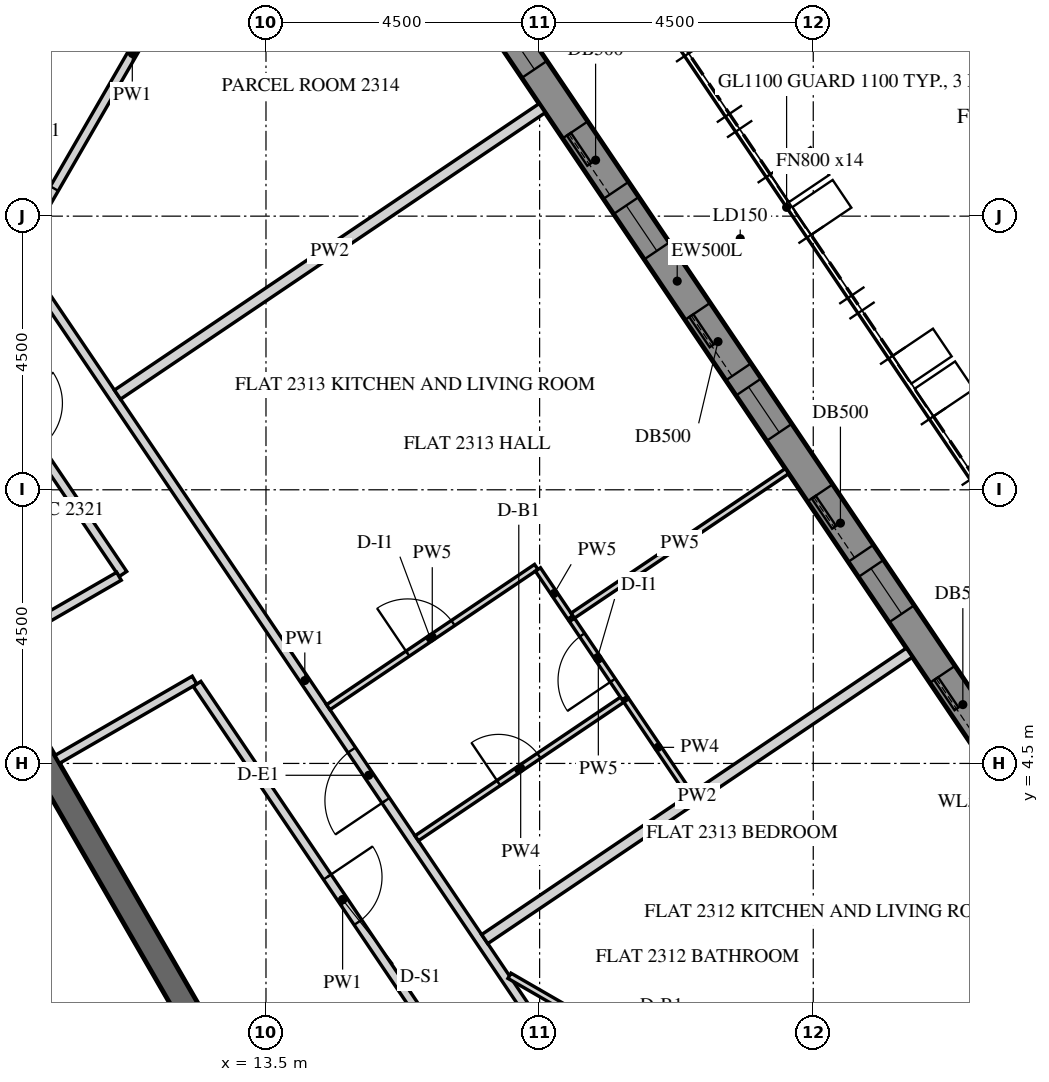
"""IFC4 building model, lengths in metres.
Left out: names, types, materials, properties, quantities, classifications, styles, units other than length and angle.
Written with IfcOpenShell. Run it as: python <this file> out.ifc"""

import sys

from ifc_helpers import new_model, si_unit, direction, frame, frame_2d, origin, place, context, subcontext, project, spatial, polyline, rectangle, outline, extrude, element, fill, save


model = new_model("IFC4")
c1 = context("Model", 3, precision=1e-05, world=origin(), true_north=direction((0.0, 1.0)))
c2 = subcontext(c1, "Body", "Model", "MODEL_VIEW")
j1 = project(units=[si_unit("LENGTHUNIT", "METRE"), si_unit("PLANEANGLEUNIT", "RADIAN")], contexts=[c1])
p1 = place(None, origin())
s1 = spatial("IfcSite", under=j1, at=p1, CompositionType="ELEMENT")
p2 = place(p1, origin())
s2 = spatial("IfcBuilding", under=s1, at=p2, CompositionType="ELEMENT")
p3 = place(p2, frame((0.0, 0.0, 291.3)))
s3 = spatial("IfcBuildingStorey", under=s2, at=p3, CompositionType="ELEMENT", Elevation=291.3)
p4 = place(p3, frame((26.706, 2.879, -0.15), z_axis=(0.0, 0.0, 1.0), x_axis=(-0.559197891507, 0.829034208061, 0.0)))
e1 = element("IfcWall", 1, at=p4, inside=s3, PredefinedType="SOLIDWALL", context=c2, shape_type="SweptSolid", body=[
    extrude(outline(polyline([(0.25, -0.25), (22.795, -0.25), (23.295, 0.25), (-0.25, 0.25), (0.25, -0.25)])), origin(), (0.0, 0.0, 1.0), 3.9),
])
p5 = place(p4, frame((1.323, 0.0, 1.05)))
e2 = element("IfcOpeningElement", 2, at=p5, cuts=e1, PredefinedType="OPENING", context=c2, shape_type="SweptSolid", body=[
    extrude(rectangle(XDim=0.9, YDim=1.5, at=frame_2d((0.45, 0.75))), frame((0.0, 0.26, 0.0), z_axis=(0.0, -1.0, 0.0), x_axis=(1.0, 0.0, 0.0)), (0.0, 0.0, 1.0), 0.52),
])
p6 = place(p4, frame((2.522, 0.0, 0.15)))
e3 = element("IfcOpeningElement", 3, at=p6, cuts=e1, PredefinedType="OPENING", context=c2, shape_type="SweptSolid", body=[
    extrude(rectangle(XDim=1.2, YDim=2.4, at=frame_2d((0.6, 1.2))), frame((0.0, 0.26, 0.0), z_axis=(0.0, -1.0, 0.0), x_axis=(1.0, 0.0, 0.0)), (0.0, 0.0, 1.0), 0.52),
])
p7 = place(p4, frame((4.922, 0.0, 1.05)))
e4 = element("IfcOpeningElement", 4, at=p7, cuts=e1, PredefinedType="OPENING", context=c2, shape_type="SweptSolid", body=[
    extrude(rectangle(XDim=0.9, YDim=1.5, at=frame_2d((0.45, 0.75))), frame((0.0, 0.26, 0.0), z_axis=(0.0, -1.0, 0.0), x_axis=(1.0, 0.0, 0.0)), (0.0, 0.0, 1.0), 0.52),
])
p8 = place(p4, frame((6.122, 0.0, 0.15)))
e5 = element("IfcOpeningElement", 5, at=p8, cuts=e1, PredefinedType="OPENING", context=c2, shape_type="SweptSolid", body=[
    extrude(rectangle(XDim=1.2, YDim=2.4, at=frame_2d((0.6, 1.2))), frame((0.0, 0.26, 0.0), z_axis=(0.0, -1.0, 0.0), x_axis=(1.0, 0.0, 0.0)), (0.0, 0.0, 1.0), 0.52),
])
p9 = place(p4, frame((8.522, 0.0, 1.05)))
e6 = element("IfcOpeningElement", 6, at=p9, cuts=e1, PredefinedType="OPENING", context=c2, shape_type="SweptSolid", body=[
    extrude(rectangle(XDim=0.9, YDim=1.5, at=frame_2d((0.45, 0.75))), frame((0.0, 0.26, 0.0), z_axis=(0.0, -1.0, 0.0), x_axis=(1.0, 0.0, 0.0)), (0.0, 0.0, 1.0), 0.52),
])
p10 = place(p4, frame((9.722, 0.0, 0.15)))
e7 = element("IfcOpeningElement", 7, at=p10, cuts=e1, PredefinedType="OPENING", context=c2, shape_type="SweptSolid", body=[
    extrude(rectangle(XDim=1.2, YDim=2.4, at=frame_2d((0.6, 1.2))), frame((0.0, 0.26, 0.0), z_axis=(0.0, -1.0, 0.0), x_axis=(1.0, 0.0, 0.0)), (0.0, 0.0, 1.0), 0.52),
])
p11 = place(p4, frame((12.122, 0.0, 1.05)))
e8 = element("IfcOpeningElement", 8, at=p11, cuts=e1, PredefinedType="OPENING", context=c2, shape_type="SweptSolid", body=[
    extrude(rectangle(XDim=0.9, YDim=1.5, at=frame_2d((0.45, 0.75))), frame((0.0, 0.26, 0.0), z_axis=(0.0, -1.0, 0.0), x_axis=(1.0, 0.0, 0.0)), (0.0, 0.0, 1.0), 0.52),
])
p12 = place(p4, frame((13.323, 0.0, 0.15)))
e9 = element("IfcOpeningElement", 9, at=p12, cuts=e1, PredefinedType="OPENING", context=c2, shape_type="SweptSolid", body=[
    extrude(rectangle(XDim=1.2, YDim=2.4, at=frame_2d((0.6, 1.2))), frame((0.0, 0.26, 0.0), z_axis=(0.0, -1.0, 0.0), x_axis=(1.0, 0.0, 0.0)), (0.0, 0.0, 1.0), 0.52),
])
p13 = place(p4, frame((15.722, 0.0, 1.05)))
e10 = element("IfcOpeningElement", 10, at=p13, cuts=e1, PredefinedType="OPENING", context=c2, shape_type="SweptSolid", body=[
    extrude(rectangle(XDim=0.9, YDim=1.5, at=frame_2d((0.45, 0.75))), frame((0.0, 0.26, 0.0), z_axis=(0.0, -1.0, 0.0), x_axis=(1.0, 0.0, 0.0)), (0.0, 0.0, 1.0), 0.52),
])
p14 = place(p4, frame((16.922, 0.0, 0.15)))
e11 = element("IfcOpeningElement", 11, at=p14, cuts=e1, PredefinedType="OPENING", context=c2, shape_type="SweptSolid", body=[
    extrude(rectangle(XDim=1.2, YDim=2.4, at=frame_2d((0.6, 1.2))), frame((0.0, 0.26, 0.0), z_axis=(0.0, -1.0, 0.0), x_axis=(1.0, 0.0, 0.0)), (0.0, 0.0, 1.0), 0.52),
])
p15 = place(p4, frame((19.323, 0.0, 1.05)))
e12 = element("IfcOpeningElement", 12, at=p15, cuts=e1, PredefinedType="OPENING", context=c2, shape_type="SweptSolid", body=[
    extrude(rectangle(XDim=0.9, YDim=1.5, at=frame_2d((0.45, 0.75))), frame((0.0, 0.26, 0.0), z_axis=(0.0, -1.0, 0.0), x_axis=(1.0, 0.0, 0.0)), (0.0, 0.0, 1.0), 0.52),
])
p16 = place(p4, frame((20.522, 0.0, 0.15)))
e13 = element("IfcOpeningElement", 13, at=p16, cuts=e1, PredefinedType="OPENING", context=c2, shape_type="SweptSolid", body=[
    extrude(rectangle(XDim=1.2, YDim=2.4, at=frame_2d((0.6, 1.2))), frame((0.0, 0.26, 0.0), z_axis=(0.0, -1.0, 0.0), x_axis=(1.0, 0.0, 0.0)), (0.0, 0.0, 1.0), 0.52),
])
p17 = place(p3, frame((12.471, 0.0, -0.15), z_axis=(0.0, 0.0, 1.0), x_axis=(-0.499996419489, 0.866027470984, 0.0)))
e14 = element("IfcWall", 14, at=p17, inside=s3, PredefinedType="SHEAR", context=c2, shape_type="SweptSolid", body=[
    extrude(outline(polyline([(-0.115, -0.2), (12.586, -0.2), (12.355, 0.2), (0.115, 0.2), (-0.115, -0.2)])), origin(), (0.0, 0.0, 1.0), 3.9),
])
p18 = place(p17, frame((5.306, 0.0, 0.15)))
e15 = element("IfcOpeningElement", 15, at=p18, cuts=e14, PredefinedType="OPENING", context=c2, shape_type="SweptSolid", body=[
    extrude(rectangle(XDim=1.8, YDim=2.4, at=frame_2d((0.9, 1.2))), frame((0.0, 0.21, 0.0), z_axis=(0.0, -1.0, 0.0), x_axis=(1.0, 0.0, 0.0)), (0.0, 0.0, 1.0), 0.42),
])
p19 = place(p3, frame((6.351, 11.0, -0.15), z_axis=(0.0, 0.0, 1.0), x_axis=(0.499998894578, 0.866026041999, 0.0)))
e16 = element("IfcWall", 16, at=p19, inside=s3, PredefinedType="SHEAR", context=c2, shape_type="SweptSolid", body=[
    extrude(rectangle(XDim=15.544, YDim=0.4, at=frame_2d((7.772, 0.0))), origin(), (0.0, 0.0, 1.0), 3.9),
])
p20 = place(p19, frame((6.872, 0.0, 0.15)))
e17 = element("IfcOpeningElement", 17, at=p20, cuts=e16, PredefinedType="OPENING", context=c2, shape_type="SweptSolid", body=[
    extrude(rectangle(XDim=1.8, YDim=2.4, at=frame_2d((0.9, 1.2))), frame((0.0, 0.21, 0.0), z_axis=(0.0, -1.0, 0.0), x_axis=(1.0, 0.0, 0.0)), (0.0, 0.0, 1.0), 0.42),
])
p21 = place(p3, frame((10.177, 21.027, 0.0), z_axis=(0.0, 0.0, 1.0), x_axis=(-0.500013707032, -0.866017489881, 0.0)))
e18 = element("IfcWall", 18, at=p21, inside=s3, PredefinedType="PARTITIONING", context=c2, shape_type="SweptSolid", body=[
    extrude(rectangle(XDim=5.781, YDim=0.15, at=frame_2d((2.89, 0.0))), origin(), (0.0, 0.0, 1.0), 2.988),
])
p22 = place(p21, frame((2.353, 0.0, 0.0)))
e19 = element("IfcOpeningElement", 19, at=p22, cuts=e18, PredefinedType="OPENING", context=c2, shape_type="SweptSolid", body=[
    extrude(rectangle(XDim=1.0, YDim=2.1, at=frame_2d((0.5, 1.05))), frame((0.0, 0.085, 0.0), z_axis=(0.0, -1.0, 0.0), x_axis=(1.0, 0.0, 0.0)), (0.0, 0.0, 1.0), 0.17),
])
p23 = place(p3, frame((18.875, -1.158, 0.0), z_axis=(0.0, 0.0, 1.0), x_axis=(-0.55919880344, 0.829033592945, 0.0)))
e20 = element("IfcWall", 20, at=p23, inside=s3, PredefinedType="PARTITIONING", context=c2, shape_type="SweptSolid", body=[
    extrude(rectangle(XDim=16.939, YDim=0.15, at=frame_2d((8.47, 0.0))), origin(), (0.0, 0.0, 1.0), 2.988),
])
p24 = place(p23, frame((6.09, 0.0, 0.0)))
e21 = element("IfcOpeningElement", 21, at=p24, cuts=e20, PredefinedType="OPENING", context=c2, shape_type="SweptSolid", body=[
    extrude(rectangle(XDim=1.0, YDim=2.1, at=frame_2d((0.5, 1.05))), frame((0.0, 0.085, 0.0), z_axis=(0.0, -1.0, 0.0), x_axis=(1.0, 0.0, 0.0)), (0.0, 0.0, 1.0), 0.17),
])
p25 = place(p3, frame((9.444, 12.957, 0.0), z_axis=(0.0, 0.0, 1.0), x_axis=(0.500004967958, 0.866022535513, 0.0)))
e22 = element("IfcWall", 22, at=p25, inside=s3, PredefinedType="PARTITIONING", context=c2, shape_type="SweptSolid", body=[
    extrude(rectangle(XDim=7.431, YDim=0.15, at=frame_2d((3.715, 0.0))), origin(), (0.0, 0.0, 1.0), 2.988),
])
p26 = place(p25, frame((0.15, 0.0, 0.0)))
e23 = element("IfcOpeningElement", 23, at=p26, cuts=e22, PredefinedType="OPENING", context=c2, shape_type="SweptSolid", body=[
    extrude(rectangle(XDim=1.0, YDim=2.1, at=frame_2d((0.5, 1.05))), frame((0.0, 0.085, 0.0), z_axis=(0.0, -1.0, 0.0), x_axis=(1.0, 0.0, 0.0)), (0.0, 0.0, 1.0), 0.17),
])
p27 = place(p3, frame((10.066, 4.566, 0.0), z_axis=(0.0, 0.0, 1.0), x_axis=(0.866034402474, 0.499984413489, 0.0)))
e24 = element("IfcWall", 24, at=p27, inside=s3, PredefinedType="PARTITIONING", context=c2, shape_type="SweptSolid", body=[
    extrude(rectangle(XDim=2.608, YDim=0.15, at=frame_2d((1.304, 0.0))), origin(), (0.0, 0.0, 1.0), 2.988),
])
p28 = place(p3, frame((12.367, 5.808, 0.0), z_axis=(0.0, 0.0, 1.0), x_axis=(0.559187256666, -0.829041381345, 0.0)))
e25 = element("IfcWall", 25, at=p28, inside=s3, PredefinedType="PARTITIONING", context=c2, shape_type="SweptSolid", body=[
    extrude(rectangle(XDim=8.56, YDim=0.15, at=frame_2d((4.28, 0.0))), origin(), (0.0, 0.0, 1.0), 2.988),
])
p29 = place(p28, frame((3.83, 0.0, 0.0)))
e26 = element("IfcOpeningElement", 26, at=p29, cuts=e25, PredefinedType="OPENING", context=c2, shape_type="SweptSolid", body=[
    extrude(rectangle(XDim=0.9, YDim=2.1, at=frame_2d((0.45, 1.05))), frame((0.0, 0.085, 0.0), z_axis=(0.0, -1.0, 0.0), x_axis=(1.0, 0.0, 0.0)), (0.0, 0.0, 1.0), 0.17),
])
p30 = place(p3, frame((7.861, 12.488, 0.0), z_axis=(0.0, 0.0, 1.0), x_axis=(0.559178186788, -0.829047498893, 0.0)))
e27 = element("IfcWall", 27, at=p30, inside=s3, PredefinedType="PARTITIONING", context=c2, shape_type="SweptSolid", body=[
    extrude(rectangle(XDim=5.878, YDim=0.15, at=frame_2d((2.939, 0.0))), origin(), (0.0, 0.0, 1.0), 2.988),
])
p31 = place(p30, frame((2.489, 0.0, 0.0)))
e28 = element("IfcOpeningElement", 28, at=p31, cuts=e27, PredefinedType="OPENING", context=c2, shape_type="SweptSolid", body=[
    extrude(rectangle(XDim=0.9, YDim=2.1, at=frame_2d((0.45, 1.05))), frame((0.0, 0.085, 0.0), z_axis=(0.0, -1.0, 0.0), x_axis=(1.0, 0.0, 0.0)), (0.0, 0.0, 1.0), 0.17),
])
p32 = place(p3, frame((11.082, 7.578, 0.0), z_axis=(0.0, 0.0, 1.0), x_axis=(-0.865993065409, -0.500056007527, 0.0)))
e29 = element("IfcWall", 29, at=p32, inside=s3, PredefinedType="PARTITIONING", context=c2, shape_type="SweptSolid", body=[
    extrude(rectangle(XDim=2.386, YDim=0.15, at=frame_2d((1.193, 0.0))), origin(), (0.0, 0.0, 1.0), 2.988),
])
p33 = place(p3, frame((17.504, 1.008, 0.0), z_axis=(0.0, 0.0, 1.0), x_axis=(0.866022112445, -0.500005700723, 0.0)))
e30 = element("IfcWall", 30, at=p33, inside=s3, PredefinedType="PARTITIONING", context=c2, shape_type="SweptSolid", body=[
    extrude(rectangle(XDim=5.745, YDim=0.1, at=frame_2d((2.873, 0.0))), origin(), (0.0, 0.0, 1.0), 2.988),
])
p34 = place(p3, frame((24.082, 6.323, 0.0), z_axis=(0.0, 0.0, 1.0), x_axis=(-0.829037762759, -0.559192621481, 0.0)))
e31 = element("IfcWall", 31, at=p34, inside=s3, PredefinedType="PARTITIONING", context=c2, shape_type="SweptSolid", body=[
    extrude(rectangle(XDim=8.425, YDim=0.18, at=frame_2d((4.212, 0.0))), origin(), (0.0, 0.0, 1.0), 2.988),
])
p35 = place(p3, frame((14.525, 5.425, 0.0), z_axis=(0.0, 0.0, 1.0), x_axis=(0.829033204172, 0.559199379811, 0.0)))
e32 = element("IfcWall", 32, at=p35, inside=s3, PredefinedType="PARTITIONING", context=c2, shape_type="SweptSolid", body=[
    extrude(rectangle(XDim=4.125, YDim=0.1, at=frame_2d((2.062, 0.0))), origin(), (0.0, 0.0, 1.0), 2.988),
])
p36 = place(p35, frame((1.575, 0.0, 0.0)))
e33 = element("IfcOpeningElement", 33, at=p36, cuts=e32, PredefinedType="OPENING", context=c2, shape_type="SweptSolid", body=[
    extrude(rectangle(XDim=0.9, YDim=2.1, at=frame_2d((0.45, 1.05))), frame((0.0, 0.06, 0.0), z_axis=(0.0, -1.0, 0.0), x_axis=(1.0, 0.0, 0.0)), (0.0, 0.0, 1.0), 0.12),
])
p37 = place(p3, frame((17.972, 7.69, 0.0), z_axis=(0.0, 0.0, 1.0), x_axis=(0.55919087136, -0.829038943227, 0.0)))
e34 = element("IfcWall", 34, at=p37, inside=s3, PredefinedType="PARTITIONING", context=c2, shape_type="SweptSolid", body=[
    extrude(rectangle(XDim=0.952, YDim=0.1, at=frame_2d((0.476, 0.0))), origin(), (0.0, 0.0, 1.0), 2.988),
])
p38 = place(p3, frame((18.545, 6.93, 0.0), z_axis=(0.0, 0.0, 1.0), x_axis=(0.829051072067, 0.5591728891, 0.0)))
e35 = element("IfcWall", 35, at=p38, inside=s3, PredefinedType="PARTITIONING", context=c2, shape_type="SweptSolid", body=[
    extrude(rectangle(XDim=4.25, YDim=0.1, at=frame_2d((2.125, 0.0))), origin(), (0.0, 0.0, 1.0), 2.988),
])
p39 = place(p3, frame((18.042, 15.276, 0.0), z_axis=(0.0, 0.0, 1.0), x_axis=(-0.829037762759, -0.559192621481, 0.0)))
e36 = element("IfcWall", 36, at=p39, inside=s3, PredefinedType="PARTITIONING", context=c2, shape_type="SweptSolid", body=[
    extrude(rectangle(XDim=8.425, YDim=0.18, at=frame_2d((4.212, 0.0))), origin(), (0.0, 0.0, 1.0), 2.988),
])
p40 = place(p3, frame((15.979, 3.269, 0.0), z_axis=(0.0, 0.0, 1.0), x_axis=(0.829051710838, 0.559171942033, 0.0)))
e37 = element("IfcWall", 37, at=p40, inside=s3, PredefinedType="PARTITIONING", context=c2, shape_type="SweptSolid", body=[
    extrude(rectangle(XDim=4.125, YDim=0.1, at=frame_2d((2.062, 0.0))), origin(), (0.0, 0.0, 1.0), 2.988),
])
p41 = place(p40, frame((1.625, 0.0, 0.0)))
e38 = element("IfcOpeningElement", 38, at=p41, cuts=e37, PredefinedType="OPENING", context=c2, shape_type="SweptSolid", body=[
    extrude(rectangle(XDim=0.8, YDim=2.1, at=frame_2d((0.4, 1.05))), frame((0.0, 0.06, 0.0), z_axis=(0.0, -1.0, 0.0), x_axis=(1.0, 0.0, 0.0)), (0.0, 0.0, 1.0), 0.12),
])
p42 = place(p3, frame((19.399, 5.574, 0.0), z_axis=(0.0, 0.0, 1.0), x_axis=(-0.559156753744, 0.829061954707, 0.0)))
e39 = element("IfcWall", 39, at=p42, inside=s3, PredefinedType="PARTITIONING", context=c2, shape_type="SweptSolid", body=[
    extrude(rectangle(XDim=1.552, YDim=0.1, at=frame_2d((0.776, 0.0))), origin(), (0.0, 0.0, 1.0), 2.988),
])
p43 = place(p42, frame((0.352, 0.0, 0.0)))
e40 = element("IfcOpeningElement", 40, at=p43, cuts=e39, PredefinedType="OPENING", context=c2, shape_type="SweptSolid", body=[
    extrude(rectangle(XDim=0.9, YDim=2.1, at=frame_2d((0.45, 1.05))), frame((0.0, 0.06, 0.0), z_axis=(0.0, -1.0, 0.0), x_axis=(1.0, 0.0, 0.0)), (0.0, 0.0, 1.0), 0.12),
])
p44 = place(p3, frame((20.466, 3.992, 0.0), z_axis=(0.0, 0.0, 1.0), x_axis=(-0.559110227504, 0.829093332201, 0.0)))
e41 = element("IfcWall", 41, at=p44, inside=s3, PredefinedType="PARTITIONING", context=c2, shape_type="SweptSolid", body=[
    extrude(rectangle(XDim=1.862, YDim=0.1, at=frame_2d((0.931, 0.0))), origin(), (0.0, 0.0, 1.0), 2.988),
])
p45 = place(p6, frame((0.0, 0.175, 0.0)))
e42 = element("IfcDoor", 42, at=p45, inside=s3, OperationType="SLIDING_TO_LEFT", PredefinedType="DOOR", context=c2, shape_type="SweptSolid", body=[
    extrude(rectangle(XDim=1.2, YDim=2.4, at=frame_2d((0.6, 1.2))), frame((0.0, 0.025, 0.0), z_axis=(0.0, -1.0, 0.0), x_axis=(1.0, 0.0, 0.0)), (0.0, 0.0, 1.0), 0.05),
])
fill(e3, e42)
p46 = place(p7, frame((0.0, 0.18, 0.0)))
e43 = element("IfcWindow", 43, at=p46, inside=s3, PartitioningType="SINGLE_PANEL", PredefinedType="WINDOW", context=c2, shape_type="SweptSolid", body=[
    extrude(rectangle(XDim=0.9, YDim=1.5, at=frame_2d((0.45, 0.75))), frame((0.0, 0.03, 0.0), z_axis=(0.0, -1.0, 0.0), x_axis=(1.0, 0.0, 0.0)), (0.0, 0.0, 1.0), 0.06),
])
fill(e4, e43)
p47 = place(p8, frame((0.0, 0.175, 0.0)))
e44 = element("IfcDoor", 44, at=p47, inside=s3, OperationType="SLIDING_TO_LEFT", PredefinedType="DOOR", context=c2, shape_type="SweptSolid", body=[
    extrude(rectangle(XDim=1.2, YDim=2.4, at=frame_2d((0.6, 1.2))), frame((0.0, 0.025, 0.0), z_axis=(0.0, -1.0, 0.0), x_axis=(1.0, 0.0, 0.0)), (0.0, 0.0, 1.0), 0.05),
])
fill(e5, e44)
p48 = place(p9, frame((0.0, 0.18, 0.0)))
e45 = element("IfcWindow", 45, at=p48, inside=s3, PartitioningType="SINGLE_PANEL", PredefinedType="WINDOW", context=c2, shape_type="SweptSolid", body=[
    extrude(rectangle(XDim=0.9, YDim=1.5, at=frame_2d((0.45, 0.75))), frame((0.0, 0.03, 0.0), z_axis=(0.0, -1.0, 0.0), x_axis=(1.0, 0.0, 0.0)), (0.0, 0.0, 1.0), 0.06),
])
fill(e6, e45)
p49 = place(p10, frame((0.0, 0.175, 0.0)))
e46 = element("IfcDoor", 46, at=p49, inside=s3, OperationType="SLIDING_TO_LEFT", PredefinedType="DOOR", context=c2, shape_type="SweptSolid", body=[
    extrude(rectangle(XDim=1.2, YDim=2.4, at=frame_2d((0.6, 1.2))), frame((0.0, 0.025, 0.0), z_axis=(0.0, -1.0, 0.0), x_axis=(1.0, 0.0, 0.0)), (0.0, 0.0, 1.0), 0.05),
])
fill(e7, e46)
p50 = place(p11, frame((0.0, 0.18, 0.0)))
e47 = element("IfcWindow", 47, at=p50, inside=s3, PartitioningType="SINGLE_PANEL", PredefinedType="WINDOW", context=c2, shape_type="SweptSolid", body=[
    extrude(rectangle(XDim=0.9, YDim=1.5, at=frame_2d((0.45, 0.75))), frame((0.0, 0.03, 0.0), z_axis=(0.0, -1.0, 0.0), x_axis=(1.0, 0.0, 0.0)), (0.0, 0.0, 1.0), 0.06),
])
fill(e8, e47)
p51 = place(p12, frame((0.0, 0.175, 0.0)))
e48 = element("IfcDoor", 48, at=p51, inside=s3, OperationType="SLIDING_TO_LEFT", PredefinedType="DOOR", context=c2, shape_type="SweptSolid", body=[
    extrude(rectangle(XDim=1.2, YDim=2.4, at=frame_2d((0.6, 1.2))), frame((0.0, 0.025, 0.0), z_axis=(0.0, -1.0, 0.0), x_axis=(1.0, 0.0, 0.0)), (0.0, 0.0, 1.0), 0.05),
])
fill(e9, e48)
p52 = place(p13, frame((0.0, 0.18, 0.0)))
e49 = element("IfcWindow", 49, at=p52, inside=s3, PartitioningType="SINGLE_PANEL", PredefinedType="WINDOW", context=c2, shape_type="SweptSolid", body=[
    extrude(rectangle(XDim=0.9, YDim=1.5, at=frame_2d((0.45, 0.75))), frame((0.0, 0.03, 0.0), z_axis=(0.0, -1.0, 0.0), x_axis=(1.0, 0.0, 0.0)), (0.0, 0.0, 1.0), 0.06),
])
fill(e10, e49)
p53 = place(p24, origin())
e50 = element("IfcDoor", 50, at=p53, inside=s3, OperationType="SINGLE_SWING_LEFT", PredefinedType="DOOR", context=c2, shape_type="SweptSolid", body=[
    extrude(rectangle(XDim=1.0, YDim=2.1, at=frame_2d((0.5, 1.05))), frame((0.0, 0.025, 0.0), z_axis=(0.0, -1.0, 0.0), x_axis=(1.0, 0.0, 0.0)), (0.0, 0.0, 1.0), 0.05),
])
fill(e21, e50)
p54 = place(p41, origin())
e51 = element("IfcDoor", 51, at=p54, inside=s3, OperationType="SINGLE_SWING_RIGHT", PredefinedType="DOOR", context=c2, shape_type="SweptSolid", body=[
    extrude(rectangle(XDim=0.8, YDim=2.1, at=frame_2d((0.4, 1.05))), frame((0.0, 0.025, 0.0), z_axis=(0.0, -1.0, 0.0), x_axis=(1.0, 0.0, 0.0)), (0.0, 0.0, 1.0), 0.05),
])
fill(e38, e51)
p55 = place(p36, origin())
e52 = element("IfcDoor", 52, at=p55, inside=s3, OperationType="SINGLE_SWING_RIGHT", PredefinedType="DOOR", context=c2, shape_type="SweptSolid", body=[
    extrude(rectangle(XDim=0.9, YDim=2.1, at=frame_2d((0.45, 1.05))), frame((0.0, 0.025, 0.0), z_axis=(0.0, -1.0, 0.0), x_axis=(1.0, 0.0, 0.0)), (0.0, 0.0, 1.0), 0.05),
])
fill(e33, e52)
p56 = place(p43, origin())
e53 = element("IfcDoor", 53, at=p56, inside=s3, OperationType="SINGLE_SWING_LEFT", PredefinedType="DOOR", context=c2, shape_type="SweptSolid", body=[
    extrude(rectangle(XDim=0.9, YDim=2.1, at=frame_2d((0.45, 1.05))), frame((0.0, 0.025, 0.0), z_axis=(0.0, -1.0, 0.0), x_axis=(1.0, 0.0, 0.0)), (0.0, 0.0, 1.0), 0.05),
])
fill(e40, e53)
p57 = place(p26, origin())
e54 = element("IfcDoor", 54, at=p57, inside=s3, OperationType="SINGLE_SWING_RIGHT", PredefinedType="DOOR", context=c2, shape_type="SweptSolid", body=[
    extrude(rectangle(XDim=1.0, YDim=2.1, at=frame_2d((0.5, 1.05))), frame((0.0, 0.025, 0.0), z_axis=(0.0, -1.0, 0.0), x_axis=(1.0, 0.0, 0.0)), (0.0, 0.0, 1.0), 0.05),
])
fill(e23, e54)
p58 = place(p29, origin())
e55 = element("IfcDoor", 55, at=p58, inside=s3, OperationType="SINGLE_SWING_RIGHT", PredefinedType="DOOR", context=c2, shape_type="SweptSolid", body=[
    extrude(rectangle(XDim=0.9, YDim=2.1, at=frame_2d((0.45, 1.05))), frame((0.0, 0.025, 0.0), z_axis=(0.0, -1.0, 0.0), x_axis=(1.0, 0.0, 0.0)), (0.0, 0.0, 1.0), 0.05),
])
fill(e26, e55)
save(model, sys.argv[1])
